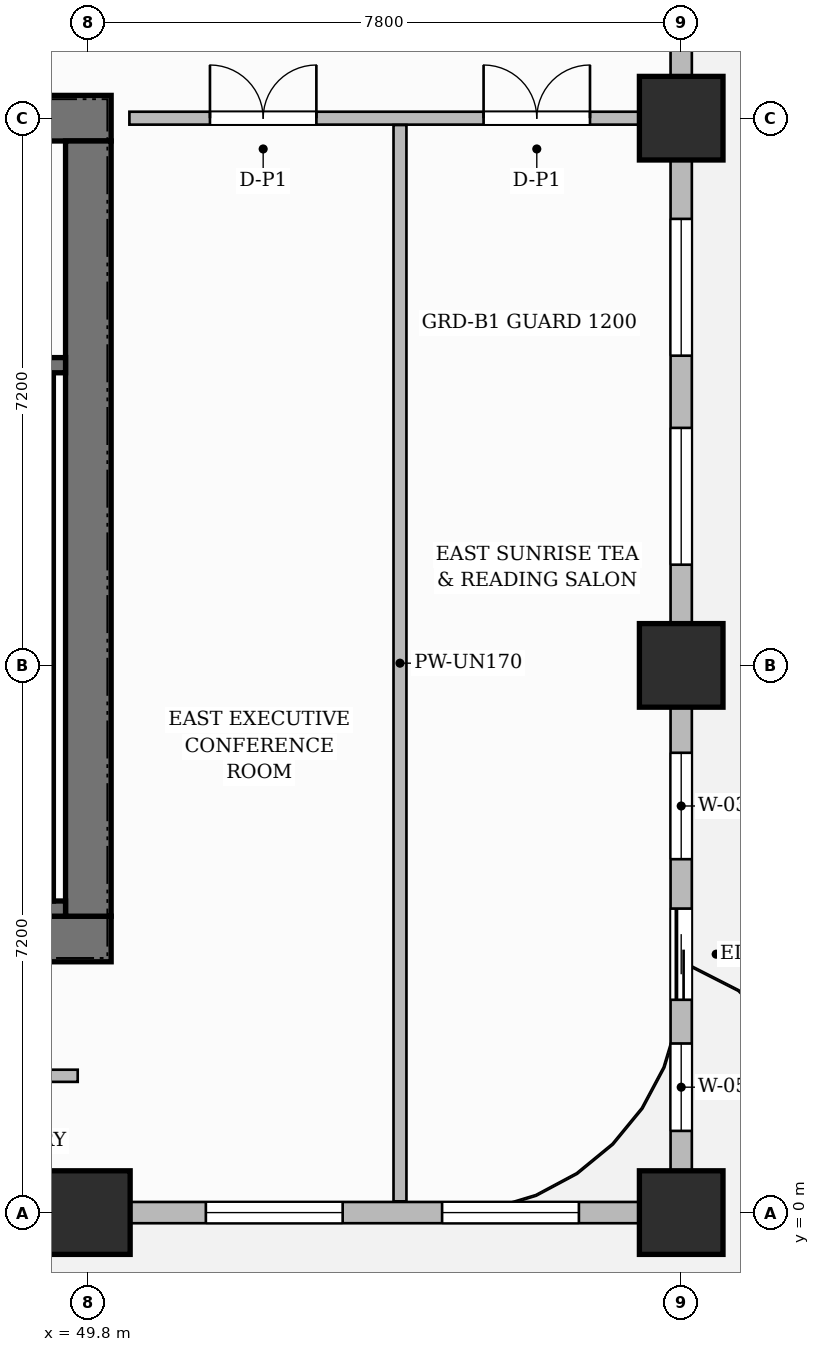
"""IFC4 building model, lengths in metres.
Left out: names, types, materials, properties, quantities, classifications, styles, units other than length and angle.
Written with IfcOpenShell. Run it as: python <this file> out.ifc"""

import sys

from ifc_helpers import new_model, si_unit, direction, frame, frame_2d, origin, origin_2d, place, context, subcontext, project, spatial, rectangle, extrude, source, transform, mapped, element, fill, save


model = new_model("IFC4")
c1 = context("Model", 3, precision=1e-05, world=origin(), true_north=direction((0.0, 1.0)))
c2 = subcontext(c1, "Body", "Model", "MODEL_VIEW")
j1 = project(units=[si_unit("LENGTHUNIT", "METRE"), si_unit("PLANEANGLEUNIT", "RADIAN")], contexts=[c1])
p1 = place(None, origin())
s1 = spatial("IfcSite", under=j1, at=p1, CompositionType="ELEMENT")
p2 = place(p1, origin())
s2 = spatial("IfcBuilding", under=s1, at=p2, CompositionType="ELEMENT")
p3 = place(p2, frame((0.0, 0.0, 43.5)))
s3 = spatial("IfcBuildingStorey", under=s2, at=p3, CompositionType="ELEMENT", Elevation=43.5)
p4 = place(p3, frame((34.5, 3.6, 0.0), z_axis=(0.0, 0.0, 1.0), x_axis=(1.0, 0.0, 0.0)))
e1 = element("IfcWall", 1, at=p4, inside=s3, PredefinedType="SHEAR", context=c2, shape_type="SweptSolid", body=[
    extrude(rectangle(XDim=15.6, YDim=0.6, at=frame_2d((7.8, 0.0))), origin(), (0.0, 0.0, 1.0), 3.7),
])
p5 = place(p4, frame((4.85, 0.0, 0.0)))
e2 = element("IfcOpeningElement", 2, at=p5, cuts=e1, PredefinedType="OPENING", context=c2, shape_type="SweptSolid", body=[
    extrude(rectangle(XDim=0.9, YDim=2.1, at=frame_2d((0.45, 1.05))), frame((0.0, 0.31, 0.0), z_axis=(0.0, -1.0, 0.0), x_axis=(1.0, 0.0, 0.0)), (0.0, 0.0, 1.0), 0.62),
])
p6 = place(p4, frame((7.27, 0.0, 0.0)))
e3 = element("IfcOpeningElement", 3, at=p6, cuts=e1, PredefinedType="OPENING", context=c2, shape_type="SweptSolid", body=[
    extrude(rectangle(XDim=0.9, YDim=2.1, at=frame_2d((0.45, 1.05))), frame((0.0, 0.31, 0.0), z_axis=(0.0, -1.0, 0.0), x_axis=(1.0, 0.0, 0.0)), (0.0, 0.0, 1.0), 0.62),
])
p7 = place(p3, frame((34.5, 14.4, 0.0), z_axis=(0.0, 0.0, 1.0), x_axis=(1.0, 0.0, 0.0)))
e4 = element("IfcWall", 4, at=p7, inside=s3, PredefinedType="SHEAR", context=c2, shape_type="SweptSolid", body=[
    extrude(rectangle(XDim=15.6, YDim=0.6, at=frame_2d((7.8, 0.0))), origin(), (0.0, 0.0, 1.0), 3.7),
])
p8 = place(p7, frame((5.43, 0.0, 0.0)))
e5 = element("IfcOpeningElement", 5, at=p8, cuts=e4, PredefinedType="OPENING", context=c2, shape_type="SweptSolid", body=[
    extrude(rectangle(XDim=1.5, YDim=2.2, at=frame_2d((0.75, 1.1))), frame((0.0, 0.31, 0.0), z_axis=(0.0, -1.0, 0.0), x_axis=(1.0, 0.0, 0.0)), (0.0, 0.0, 1.0), 0.62),
])
p9 = place(p7, frame((1.645, 0.0, 0.0)))
e6 = element("IfcOpeningElement", 6, at=p9, cuts=e4, PredefinedType="OPENING", context=c2, shape_type="SweptSolid", body=[
    extrude(rectangle(XDim=1.05, YDim=2.15, at=frame_2d((0.525, 1.075))), frame((0.0, 0.31, 0.0), z_axis=(0.0, -1.0, 0.0), x_axis=(1.0, 0.0, 0.0)), (0.0, 0.0, 1.0), 0.62),
])
p10 = place(p7, frame((11.275, 0.0, 0.0)))
e7 = element("IfcOpeningElement", 7, at=p10, cuts=e4, PredefinedType="OPENING", context=c2, shape_type="SweptSolid", body=[
    extrude(rectangle(XDim=1.05, YDim=2.15, at=frame_2d((0.525, 1.075))), frame((0.0, 0.31, 0.0), z_axis=(0.0, -1.0, 0.0), x_axis=(1.0, 0.0, 0.0)), (0.0, 0.0, 1.0), 0.62),
])
p11 = place(p3, frame((49.8, 3.9, 0.0), z_axis=(0.0, 0.0, 1.0), x_axis=(0.0, 1.0, 0.0)))
e8 = element("IfcWall", 8, at=p11, inside=s3, PredefinedType="SHEAR", context=c2, shape_type="SweptSolid", body=[
    extrude(rectangle(XDim=10.2, YDim=0.6, at=frame_2d((5.1, 0.0))), origin(), (0.0, 0.0, 1.0), 3.7),
])
m1 = source(origin(), c2, "Body", "SweptSolid", [
    extrude(rectangle(XDim=1.1, YDim=1.1, at=origin_2d()), origin(), (0.0, 0.0, 1.0), 3.7),
])
for number, where, z_axis, x_axis in (
    (9, (49.8, 0.0, 0.0), (0.0, 0.0, 1.0), (1.0, 0.0, 0.0)),
    (10, (57.6, 0.0, 0.0), (0.0, 0.0, 1.0), (1.0, 0.0, 0.0)),
    (11, (57.6, 7.2, 0.0), (0.0, 0.0, 1.0), (1.0, 0.0, 0.0)),
    (12, (57.6, 14.4, 0.0), (0.0, 0.0, 1.0), (1.0, 0.0, 0.0)),
):
    element("IfcColumn", number, at=place(p3, frame(where, z_axis=z_axis, x_axis=x_axis)), inside=s3, PredefinedType="COLUMN", context=c2, shape_type="MappedRepresentation", body=[
        mapped(m1, transform((0.0, 0.0, 0.0), scale=1.0)),
    ])
p12 = place(p3, frame((43.12, 4.0, 0.0), z_axis=(0.0, 0.0, 1.0), x_axis=(1.0, 0.0, 0.0)))
e13 = element("IfcWall", 13, at=p12, inside=s3, PredefinedType="SHEAR", context=c2, shape_type="SweptSolid", body=[
    extrude(rectangle(XDim=6.38, YDim=0.2, at=frame_2d((3.19, 0.0))), origin(), (0.0, 0.0, 1.0), 3.7),
])
p13 = place(p3, frame((49.24, 4.1, 0.0), z_axis=(0.0, 0.0, 1.0), x_axis=(0.0, 1.0, 0.0)))
e14 = element("IfcWall", 14, at=p13, inside=s3, PredefinedType="SHEAR", context=c2, shape_type="SweptSolid", body=[
    extrude(rectangle(XDim=6.95, YDim=0.2, at=frame_2d((3.475, 0.0))), origin(), (0.0, 0.0, 1.0), 3.7),
])
p14 = place(p3, frame((43.12, 11.15, 0.0), z_axis=(0.0, 0.0, 1.0), x_axis=(1.0, 0.0, 0.0)))
e15 = element("IfcWall", 15, at=p14, inside=s3, PredefinedType="SHEAR", context=c2, shape_type="SweptSolid", body=[
    extrude(rectangle(XDim=6.38, YDim=0.2, at=frame_2d((3.19, 0.0))), origin(), (0.0, 0.0, 1.0), 3.7),
])
p15 = place(p14, frame((1.045, 0.0, 0.0)))
e16 = element("IfcOpeningElement", 16, at=p15, cuts=e15, PredefinedType="OPENING", context=c2, shape_type="SweptSolid", body=[
    extrude(rectangle(XDim=1.05, YDim=2.2, at=frame_2d((0.525, 1.1))), frame((0.0, 0.11, 0.0), z_axis=(0.0, -1.0, 0.0), x_axis=(1.0, 0.0, 0.0)), (0.0, 0.0, 1.0), 0.22),
])
p16 = place(p14, frame((4.125, 0.0, 0.0)))
e17 = element("IfcOpeningElement", 17, at=p16, cuts=e15, PredefinedType="OPENING", context=c2, shape_type="SweptSolid", body=[
    extrude(rectangle(XDim=1.05, YDim=2.2, at=frame_2d((0.525, 1.1))), frame((0.0, 0.11, 0.0), z_axis=(0.0, -1.0, 0.0), x_axis=(1.0, 0.0, 0.0)), (0.0, 0.0, 1.0), 0.22),
])
p17 = place(p3, frame((30.29, 1.8, 0.0), z_axis=(0.0, 0.0, 1.0), x_axis=(1.0, 0.0, 0.0)))
e18 = element("IfcWall", 18, at=p17, inside=s3, PredefinedType="PARTITIONING", context=c2, shape_type="SweptSolid", body=[
    extrude(rectangle(XDim=19.37, YDim=0.16, at=frame_2d((9.685, 0.0))), origin(), (0.0, 0.0, 1.0), 3.45),
])
p18 = place(p17, frame((5.213, 0.0, 0.0)))
e19 = element("IfcOpeningElement", 19, at=p18, cuts=e18, PredefinedType="OPENING", context=c2, shape_type="SweptSolid", body=[
    extrude(rectangle(XDim=0.9, YDim=2.15, at=frame_2d((0.45, 1.075))), frame((0.0, 0.09, 0.0), z_axis=(0.0, -1.0, 0.0), x_axis=(1.0, 0.0, 0.0)), (0.0, 0.0, 1.0), 0.18),
])
p19 = place(p17, frame((14.06, 0.0, 0.0)))
e20 = element("IfcOpeningElement", 20, at=p19, cuts=e18, PredefinedType="OPENING", context=c2, shape_type="SweptSolid", body=[
    extrude(rectangle(XDim=0.9, YDim=2.15, at=frame_2d((0.45, 1.075))), frame((0.0, 0.09, 0.0), z_axis=(0.0, -1.0, 0.0), x_axis=(1.0, 0.0, 0.0)), (0.0, 0.0, 1.0), 0.18),
])
p20 = place(p3, frame((50.34, 14.4, 0.0), z_axis=(0.0, 0.0, 1.0), x_axis=(1.0, 0.0, 0.0)))
e21 = element("IfcWall", 21, at=p20, inside=s3, PredefinedType="PARTITIONING", context=c2, shape_type="SweptSolid", body=[
    extrude(rectangle(XDim=7.07, YDim=0.17, at=frame_2d((3.535, 0.0))), origin(), (0.0, 0.0, 1.0), 2.885),
])
p21 = place(p20, frame((1.06, 0.0, 0.0)))
e22 = element("IfcOpeningElement", 22, at=p21, cuts=e21, PredefinedType="OPENING", context=c2, shape_type="SweptSolid", body=[
    extrude(rectangle(XDim=1.4, YDim=2.35, at=frame_2d((0.7, 1.175))), frame((0.0, 0.095, 0.0), z_axis=(0.0, -1.0, 0.0), x_axis=(1.0, 0.0, 0.0)), (0.0, 0.0, 1.0), 0.19),
])
p22 = place(p20, frame((4.66, 0.0, 0.0)))
e23 = element("IfcOpeningElement", 23, at=p22, cuts=e21, PredefinedType="OPENING", context=c2, shape_type="SweptSolid", body=[
    extrude(rectangle(XDim=1.4, YDim=2.35, at=frame_2d((0.7, 1.175))), frame((0.0, 0.095, 0.0), z_axis=(0.0, -1.0, 0.0), x_axis=(1.0, 0.0, 0.0)), (0.0, 0.0, 1.0), 0.19),
])
p23 = place(p3, frame((53.9, 0.148, 0.0), z_axis=(0.0, 0.0, 1.0), x_axis=(0.0, 1.0, 0.0)))
e24 = element("IfcWall", 24, at=p23, inside=s3, PredefinedType="PARTITIONING", context=c2, shape_type="SweptSolid", body=[
    extrude(rectangle(XDim=14.162, YDim=0.17, at=frame_2d((7.081, 0.0))), origin(), (0.0, 0.0, 1.0), 3.035),
])
p24 = place(p3, frame((14.4, 0.0, 0.0), z_axis=(0.0, 0.0, 1.0), x_axis=(1.0, 0.0, 0.0)))
e25 = element("IfcWall", 25, at=p24, inside=s3, PredefinedType="SOLIDWALL", context=c2, shape_type="SweptSolid", body=[
    extrude(rectangle(XDim=43.2, YDim=0.28, at=frame_2d((21.6, 0.0))), origin(), (0.0, 0.0, 1.0), 2.885),
])
p25 = place(p24, frame((1.5, 0.0, 0.0)))
e26 = element("IfcOpeningElement", 26, at=p25, cuts=e25, PredefinedType="OPENING", context=c2, shape_type="SweptSolid", body=[
    extrude(rectangle(XDim=1.2, YDim=2.2, at=frame_2d((0.6, 1.1))), frame((0.0, 0.15, 0.0), z_axis=(0.0, -1.0, 0.0), x_axis=(1.0, 0.0, 0.0)), (0.0, 0.0, 1.0), 0.3),
])
p26 = place(p24, frame((3.8, 0.0, 0.8)))
e27 = element("IfcOpeningElement", 27, at=p26, cuts=e25, PredefinedType="OPENING", context=c2, shape_type="SweptSolid", body=[
    extrude(rectangle(XDim=1.8, YDim=1.85, at=frame_2d((0.9, 0.925))), frame((0.0, 0.15, 0.0), z_axis=(0.0, -1.0, 0.0), x_axis=(1.0, 0.0, 0.0)), (0.0, 0.0, 1.0), 0.3),
])
p27 = place(p24, frame((8.181, 0.0, 0.8)))
e28 = element("IfcOpeningElement", 28, at=p27, cuts=e25, PredefinedType="OPENING", context=c2, shape_type="SweptSolid", body=[
    extrude(rectangle(XDim=0.95, YDim=1.75, at=frame_2d((0.475, 0.875))), frame((0.0, 0.15, 0.0), z_axis=(0.0, -1.0, 0.0), x_axis=(1.0, 0.0, 0.0)), (0.0, 0.0, 1.0), 0.3),
])
p28 = place(p24, frame((10.564, 0.0, 0.8)))
e29 = element("IfcOpeningElement", 29, at=p28, cuts=e25, PredefinedType="OPENING", context=c2, shape_type="SweptSolid", body=[
    extrude(rectangle(XDim=1.8, YDim=1.85, at=frame_2d((0.9, 0.925))), frame((0.0, 0.15, 0.0), z_axis=(0.0, -1.0, 0.0), x_axis=(1.0, 0.0, 0.0)), (0.0, 0.0, 1.0), 0.3),
])
p29 = place(p24, frame((16.804, 0.0, 0.8)))
e30 = element("IfcOpeningElement", 30, at=p29, cuts=e25, PredefinedType="OPENING", context=c2, shape_type="SweptSolid", body=[
    extrude(rectangle(XDim=1.8, YDim=1.85, at=frame_2d((0.9, 0.925))), frame((0.0, 0.15, 0.0), z_axis=(0.0, -1.0, 0.0), x_axis=(1.0, 0.0, 0.0)), (0.0, 0.0, 1.0), 0.3),
])
p30 = place(p24, frame((22.396, 0.0, 0.8)))
e31 = element("IfcOpeningElement", 31, at=p30, cuts=e25, PredefinedType="OPENING", context=c2, shape_type="SweptSolid", body=[
    extrude(rectangle(XDim=1.8, YDim=1.85, at=frame_2d((0.9, 0.925))), frame((0.0, 0.15, 0.0), z_axis=(0.0, -1.0, 0.0), x_axis=(1.0, 0.0, 0.0)), (0.0, 0.0, 1.0), 0.3),
])
p31 = place(p24, frame((25.629, 0.0, 0.8)))
e32 = element("IfcOpeningElement", 32, at=p31, cuts=e25, PredefinedType="OPENING", context=c2, shape_type="SweptSolid", body=[
    extrude(rectangle(XDim=0.95, YDim=1.75, at=frame_2d((0.475, 0.875))), frame((0.0, 0.15, 0.0), z_axis=(0.0, -1.0, 0.0), x_axis=(1.0, 0.0, 0.0)), (0.0, 0.0, 1.0), 0.3),
])
p32 = place(p24, frame((29.075, 0.0, 0.8)))
e33 = element("IfcOpeningElement", 33, at=p32, cuts=e25, PredefinedType="OPENING", context=c2, shape_type="SweptSolid", body=[
    extrude(rectangle(XDim=1.8, YDim=1.85, at=frame_2d((0.9, 0.925))), frame((0.0, 0.15, 0.0), z_axis=(0.0, -1.0, 0.0), x_axis=(1.0, 0.0, 0.0)), (0.0, 0.0, 1.0), 0.3),
])
p33 = place(p24, frame((32.125, 0.0, 0.8)))
e34 = element("IfcOpeningElement", 34, at=p33, cuts=e25, PredefinedType="OPENING", context=c2, shape_type="SweptSolid", body=[
    extrude(rectangle(XDim=1.8, YDim=1.85, at=frame_2d((0.9, 0.925))), frame((0.0, 0.15, 0.0), z_axis=(0.0, -1.0, 0.0), x_axis=(1.0, 0.0, 0.0)), (0.0, 0.0, 1.0), 0.3),
])
p34 = place(p24, frame((36.946, 0.0, 0.8)))
e35 = element("IfcOpeningElement", 35, at=p34, cuts=e25, PredefinedType="OPENING", context=c2, shape_type="SweptSolid", body=[
    extrude(rectangle(XDim=1.8, YDim=1.85, at=frame_2d((0.9, 0.925))), frame((0.0, 0.15, 0.0), z_axis=(0.0, -1.0, 0.0), x_axis=(1.0, 0.0, 0.0)), (0.0, 0.0, 1.0), 0.3),
])
p35 = place(p24, frame((40.054, 0.0, 0.8)))
e36 = element("IfcOpeningElement", 36, at=p35, cuts=e25, PredefinedType="OPENING", context=c2, shape_type="SweptSolid", body=[
    extrude(rectangle(XDim=1.8, YDim=1.85, at=frame_2d((0.9, 0.925))), frame((0.0, 0.15, 0.0), z_axis=(0.0, -1.0, 0.0), x_axis=(1.0, 0.0, 0.0)), (0.0, 0.0, 1.0), 0.3),
])
p36 = place(p3, frame((57.6, 0.05, 0.0), z_axis=(0.0, 0.0, 1.0), x_axis=(0.0, 1.0, 0.0)))
e37 = element("IfcWall", 37, at=p36, inside=s3, PredefinedType="SOLIDWALL", context=c2, shape_type="SweptSolid", body=[
    extrude(rectangle(XDim=21.5, YDim=0.28, at=frame_2d((10.75, 0.0))), origin(), (0.0, 0.0, 1.0), 2.885),
])
p37 = place(p36, frame((2.75, 0.0, 0.0)))
e38 = element("IfcOpeningElement", 38, at=p37, cuts=e37, PredefinedType="OPENING", context=c2, shape_type="SweptSolid", body=[
    extrude(rectangle(XDim=1.2, YDim=2.2, at=frame_2d((0.6, 1.1))), frame((0.0, 0.15, 0.0), z_axis=(0.0, -1.0, 0.0), x_axis=(1.0, 0.0, 0.0)), (0.0, 0.0, 1.0), 0.3),
])
p38 = place(p36, frame((1.025, 0.0, 0.8)))
e39 = element("IfcOpeningElement", 39, at=p38, cuts=e37, PredefinedType="OPENING", context=c2, shape_type="SweptSolid", body=[
    extrude(rectangle(XDim=1.15, YDim=1.8, at=frame_2d((0.575, 0.9))), frame((0.0, 0.15, 0.0), z_axis=(0.0, -1.0, 0.0), x_axis=(1.0, 0.0, 0.0)), (0.0, 0.0, 1.0), 0.3),
])
p39 = place(p36, frame((4.6, 0.0, 0.8)))
e40 = element("IfcOpeningElement", 40, at=p39, cuts=e37, PredefinedType="OPENING", context=c2, shape_type="SweptSolid", body=[
    extrude(rectangle(XDim=1.4, YDim=1.85, at=frame_2d((0.7, 0.925))), frame((0.0, 0.15, 0.0), z_axis=(0.0, -1.0, 0.0), x_axis=(1.0, 0.0, 0.0)), (0.0, 0.0, 1.0), 0.3),
])
p40 = place(p36, frame((8.475, 0.0, 0.8)))
e41 = element("IfcOpeningElement", 41, at=p40, cuts=e37, PredefinedType="OPENING", context=c2, shape_type="SweptSolid", body=[
    extrude(rectangle(XDim=1.8, YDim=1.85, at=frame_2d((0.9, 0.925))), frame((0.0, 0.15, 0.0), z_axis=(0.0, -1.0, 0.0), x_axis=(1.0, 0.0, 0.0)), (0.0, 0.0, 1.0), 0.3),
])
p41 = place(p36, frame((11.225, 0.0, 0.8)))
e42 = element("IfcOpeningElement", 42, at=p41, cuts=e37, PredefinedType="OPENING", context=c2, shape_type="SweptSolid", body=[
    extrude(rectangle(XDim=1.8, YDim=1.85, at=frame_2d((0.9, 0.925))), frame((0.0, 0.15, 0.0), z_axis=(0.0, -1.0, 0.0), x_axis=(1.0, 0.0, 0.0)), (0.0, 0.0, 1.0), 0.3),
])
p42 = place(p36, frame((15.471, 0.0, 0.8)))
e43 = element("IfcOpeningElement", 43, at=p42, cuts=e37, PredefinedType="OPENING", context=c2, shape_type="SweptSolid", body=[
    extrude(rectangle(XDim=1.15, YDim=1.8, at=frame_2d((0.575, 0.9))), frame((0.0, 0.15, 0.0), z_axis=(0.0, -1.0, 0.0), x_axis=(1.0, 0.0, 0.0)), (0.0, 0.0, 1.0), 0.3),
])
p43 = place(p36, frame((17.954, 0.0, 0.8)))
e44 = element("IfcOpeningElement", 44, at=p43, cuts=e37, PredefinedType="OPENING", context=c2, shape_type="SweptSolid", body=[
    extrude(rectangle(XDim=1.8, YDim=1.85, at=frame_2d((0.9, 0.925))), frame((0.0, 0.15, 0.0), z_axis=(0.0, -1.0, 0.0), x_axis=(1.0, 0.0, 0.0)), (0.0, 0.0, 1.0), 0.3),
])
m2 = source(origin(), c2, "Body", "SweptSolid", [
    extrude(rectangle(XDim=1.4, YDim=2.35, at=frame_2d((0.7, 1.175))), frame((0.0, 0.025, 0.0), z_axis=(0.0, -1.0, 0.0), x_axis=(1.0, 0.0, 0.0)), (0.0, 0.0, 1.0), 0.05),
])
p44 = place(p21, origin())
e45 = element("IfcDoor", 45, at=p44, inside=s3, OperationType="DOUBLE_DOOR_SINGLE_SWING", PredefinedType="DOOR", context=c2, shape_type="MappedRepresentation", body=[
    mapped(m2, transform((0.0, 0.0, 0.0), scale=1.0)),
])
fill(e22, e45)
p45 = place(p22, origin())
e46 = element("IfcDoor", 46, at=p45, inside=s3, OperationType="DOUBLE_DOOR_SINGLE_SWING", PredefinedType="DOOR", context=c2, shape_type="MappedRepresentation", body=[
    mapped(m2, transform((0.0, 0.0, 0.0), scale=1.0)),
])
fill(e23, e46)
m3 = source(origin(), c2, "Body", "SweptSolid", [
    extrude(rectangle(XDim=1.2, YDim=2.2, at=frame_2d((0.6, 1.1))), frame((0.0, 0.025, 0.0), z_axis=(0.0, -1.0, 0.0), x_axis=(1.0, 0.0, 0.0)), (0.0, 0.0, 1.0), 0.05),
])
p46 = place(p37, origin())
e47 = element("IfcDoor", 47, at=p46, inside=s3, OperationType="SLIDING_TO_LEFT", PredefinedType="DOOR", context=c2, shape_type="MappedRepresentation", body=[
    mapped(m3, transform((0.0, 0.0, 0.0), scale=1.0)),
])
fill(e38, e47)
m4 = source(origin(), c2, "Body", "SweptSolid", [
    extrude(rectangle(XDim=1.8, YDim=1.85, at=frame_2d((0.9, 0.925))), frame((0.0, 0.03, 0.0), z_axis=(0.0, -1.0, 0.0), x_axis=(1.0, 0.0, 0.0)), (0.0, 0.0, 1.0), 0.06),
])
p47 = place(p34, origin())
e48 = element("IfcWindow", 48, at=p47, inside=s3, PartitioningType="DOUBLE_PANEL_VERTICAL", PredefinedType="WINDOW", context=c2, shape_type="MappedRepresentation", body=[
    mapped(m4, transform((0.0, 0.0, 0.0), scale=1.0)),
])
fill(e35, e48)
p48 = place(p35, origin())
e49 = element("IfcWindow", 49, at=p48, inside=s3, PartitioningType="DOUBLE_PANEL_VERTICAL", PredefinedType="WINDOW", context=c2, shape_type="MappedRepresentation", body=[
    mapped(m4, transform((0.0, 0.0, 0.0), scale=1.0)),
])
fill(e36, e49)
m5 = source(origin(), c2, "Body", "SweptSolid", [
    extrude(rectangle(XDim=1.15, YDim=1.8, at=frame_2d((0.575, 0.9))), frame((0.0, 0.03, 0.0), z_axis=(0.0, -1.0, 0.0), x_axis=(1.0, 0.0, 0.0)), (0.0, 0.0, 1.0), 0.06),
])
p49 = place(p38, origin())
e50 = element("IfcWindow", 50, at=p49, inside=s3, PartitioningType="SINGLE_PANEL", PredefinedType="WINDOW", context=c2, shape_type="MappedRepresentation", body=[
    mapped(m5, transform((0.0, 0.0, 0.0), scale=1.0)),
])
fill(e39, e50)
m6 = source(origin(), c2, "Body", "SweptSolid", [
    extrude(rectangle(XDim=1.4, YDim=1.85, at=frame_2d((0.7, 0.925))), frame((0.0, 0.03, 0.0), z_axis=(0.0, -1.0, 0.0), x_axis=(1.0, 0.0, 0.0)), (0.0, 0.0, 1.0), 0.06),
])
p50 = place(p39, origin())
e51 = element("IfcWindow", 51, at=p50, inside=s3, PartitioningType="SINGLE_PANEL", PredefinedType="WINDOW", context=c2, shape_type="MappedRepresentation", body=[
    mapped(m6, transform((0.0, 0.0, 0.0), scale=1.0)),
])
fill(e40, e51)
p51 = place(p40, origin())
e52 = element("IfcWindow", 52, at=p51, inside=s3, PartitioningType="DOUBLE_PANEL_VERTICAL", PredefinedType="WINDOW", context=c2, shape_type="MappedRepresentation", body=[
    mapped(m4, transform((0.0, 0.0, 0.0), scale=1.0)),
])
fill(e41, e52)
p52 = place(p41, origin())
e53 = element("IfcWindow", 53, at=p52, inside=s3, PartitioningType="DOUBLE_PANEL_VERTICAL", PredefinedType="WINDOW", context=c2, shape_type="MappedRepresentation", body=[
    mapped(m4, transform((0.0, 0.0, 0.0), scale=1.0)),
])
fill(e42, e53)
save(model, sys.argv[1])
